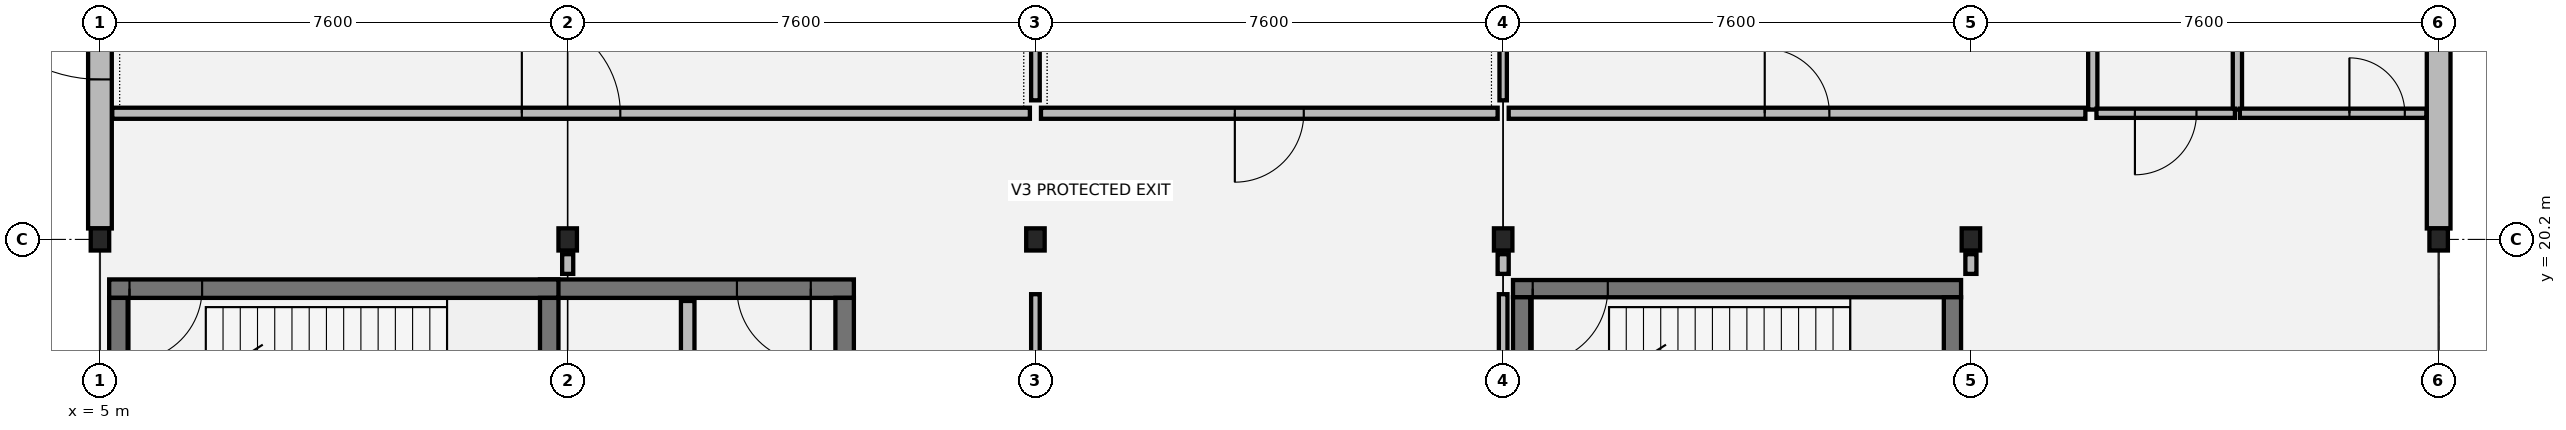
"""IFC4 building model, lengths in metres.
Left out: names, types, materials, properties, quantities, classifications, styles, units other than length and angle.
Written with IfcOpenShell. Run it as: python <this file> out.ifc"""

import sys

from ifc_helpers import new_model, si_unit, direction, frame, frame_2d, origin, origin_2d, place, context, subcontext, project, spatial, rectangle, i_section, extrude, element, fill, save


model = new_model("IFC4")
c1 = context("Model", 3, precision=1e-05, world=origin(), true_north=direction((0.0, 1.0)))
c2 = subcontext(c1, "Body", "Model", "MODEL_VIEW")
j1 = project(units=[si_unit("LENGTHUNIT", "METRE"), si_unit("PLANEANGLEUNIT", "RADIAN")], contexts=[c1])
p1 = place(None, origin())
s1 = spatial("IfcSite", under=j1, at=p1, CompositionType="ELEMENT")
p2 = place(p1, origin())
s2 = spatial("IfcBuilding", under=s1, at=p2, CompositionType="ELEMENT")
p3 = place(p2, origin())
s3 = spatial("IfcBuildingStorey", under=s2, at=p3, CompositionType="ELEMENT", Elevation=0.0)
for number, where, z_axis, x_axis in (
    (1, (5.0, 20.2, 0.0), (0.0, 0.0, 1.0), (1.0, 0.0, 0.0)),
    (2, (12.6, 20.2, 0.0), (0.0, 0.0, 1.0), (1.0, 0.0, 0.0)),
    (3, (20.2, 20.2, 0.0), (0.0, 0.0, 1.0), (1.0, 0.0, 0.0)),
    (4, (27.8, 20.2, 0.0), (0.0, 0.0, 1.0), (1.0, 0.0, 0.0)),
    (5, (35.4, 20.2, 0.0), (0.0, 0.0, 1.0), (1.0, 0.0, 0.0)),
    (6, (43.0, 20.2, 0.0), (0.0, 0.0, 1.0), (1.0, 0.0, 0.0)),
):
    element("IfcColumn", number, at=place(p3, frame(where, z_axis=z_axis, x_axis=x_axis)), inside=s3, PredefinedType="COLUMN", context=c2, shape_type="SweptSolid", body=[
        extrude(i_section(OverallWidth=0.3, OverallDepth=0.36, WebThickness=0.012, FlangeThickness=0.022, at=origin_2d()), origin(), (0.0, 0.0, 1.0), 5.075),
    ])
p4 = place(p3, frame((43.0, 20.378, 0.0), z_axis=(0.0, 0.0, 1.0), x_axis=(0.0, 1.0, 0.0)))
e7 = element("IfcWall", 7, at=p4, inside=s3, PredefinedType="SOLIDWALL", context=c2, shape_type="SweptSolid", body=[
    extrude(rectangle(XDim=7.244, YDim=0.385, at=frame_2d((3.622, 0.0))), origin(), (0.0, 0.0, 1.0), 4.5),
])
p5 = place(p3, frame((5.0, 27.622, 0.0), z_axis=(0.0, 0.0, 1.0), x_axis=(0.0, -1.0, 0.0)))
e8 = element("IfcWall", 8, at=p5, inside=s3, PredefinedType="SOLIDWALL", context=c2, shape_type="SweptSolid", body=[
    extrude(rectangle(XDim=7.244, YDim=0.385, at=frame_2d((3.622, 0.0))), origin(), (0.0, 0.0, 1.0), 4.5),
])
p6 = place(p5, frame((2.422, 0.0, 0.0)))
e9 = element("IfcOpeningElement", 9, at=p6, cuts=e8, PredefinedType="OPENING", context=c2, shape_type="SweptSolid", body=[
    extrude(rectangle(XDim=2.4, YDim=2.6, at=frame_2d((1.2, 1.3))), frame((0.0, 0.202, 0.0), z_axis=(0.0, -1.0, 0.0), x_axis=(1.0, 0.0, 0.0)), (0.0, 0.0, 1.0), 0.405),
])
p7 = place(p3, frame((17.25, 19.4, 0.0), z_axis=(0.0, 0.0, 1.0), x_axis=(-1.0, 0.0, 0.0)))
e10 = element("IfcWall", 10, at=p7, inside=s3, PredefinedType="SHEAR", context=c2, shape_type="SweptSolid", body=[
    extrude(rectangle(XDim=5.1, YDim=0.3, at=frame_2d((2.55, 0.0))), origin(), (0.0, 0.0, 1.0), 4.922),
])
p8 = place(p7, frame((0.7, 0.0, 0.0)))
e11 = element("IfcOpeningElement", 11, at=p8, cuts=e10, PredefinedType="OPENING", context=c2, shape_type="SweptSolid", body=[
    extrude(rectangle(XDim=1.2, YDim=2.16, at=frame_2d((0.6, 1.08))), frame((0.0, 0.16, 0.0), z_axis=(0.0, -1.0, 0.0), x_axis=(1.0, 0.0, 0.0)), (0.0, 0.0, 1.0), 0.32),
])
p9 = place(p3, frame((17.1, 13.55, 0.0), z_axis=(0.0, 0.0, 1.0), x_axis=(0.0, 1.0, 0.0)))
e12 = element("IfcWall", 12, at=p9, inside=s3, PredefinedType="SHEAR", context=c2, shape_type="SweptSolid", body=[
    extrude(rectangle(XDim=5.7, YDim=0.3, at=frame_2d((2.85, 0.0))), origin(), (0.0, 0.0, 1.0), 4.922),
])
p10 = place(p3, frame((14.55, 13.6, 0.0), z_axis=(0.0, 0.0, 1.0), x_axis=(0.0, 1.0, 0.0)))
e13 = element("IfcWall", 13, at=p10, inside=s3, PredefinedType="SOLIDWALL", context=c2, shape_type="SweptSolid", body=[
    extrude(rectangle(XDim=5.6, YDim=0.22, at=frame_2d((2.8, 0.0))), origin(), (0.0, 0.0, 1.0), 4.922),
])
p11 = place(p10, frame((0.35, 0.0, 0.0)))
e14 = element("IfcOpeningElement", 14, at=p11, cuts=e13, PredefinedType="OPENING", context=c2, shape_type="SweptSolid", body=[
    extrude(rectangle(XDim=1.1, YDim=2.15, at=frame_2d((0.55, 1.075))), frame((0.0, 0.12, 0.0), z_axis=(0.0, -1.0, 0.0), x_axis=(1.0, 0.0, 0.0)), (0.0, 0.0, 1.0), 0.24),
])
p12 = place(p3, frame((5.15, 19.4, 0.0), z_axis=(0.0, 0.0, 1.0), x_axis=(1.0, 0.0, 0.0)))
e15 = element("IfcWall", 15, at=p12, inside=s3, PredefinedType="SHEAR", context=c2, shape_type="SweptSolid", body=[
    extrude(rectangle(XDim=7.3, YDim=0.3, at=frame_2d((3.65, 0.0))), origin(), (0.0, 0.0, 1.0), 4.922),
])
p13 = place(p12, frame((0.33, 0.0, 0.0)))
e16 = element("IfcOpeningElement", 16, at=p13, cuts=e15, PredefinedType="OPENING", context=c2, shape_type="SweptSolid", body=[
    extrude(rectangle(XDim=1.18, YDim=2.18, at=frame_2d((0.59, 1.09))), frame((0.0, 0.16, 0.0), z_axis=(0.0, -1.0, 0.0), x_axis=(1.0, 0.0, 0.0)), (0.0, 0.0, 1.0), 0.32),
])
for number, where, z_axis, x_axis in (
    (17, (5.3, 13.55, 0.0), (0.0, 0.0, 1.0), (0.0, 1.0, 0.0)),
    (18, (12.3, 13.55, 0.0), (0.0, 0.0, 1.0), (0.0, 1.0, 0.0)),
):
    element("IfcWall", number, at=place(p3, frame(where, z_axis=z_axis, x_axis=x_axis)), inside=s3, PredefinedType="SHEAR", context=c2, shape_type="SweptSolid", body=[
        extrude(rectangle(XDim=5.7, YDim=0.3, at=frame_2d((2.85, 0.0))), origin(), (0.0, 0.0, 1.0), 4.922),
    ])
p14 = place(p3, frame((27.96, 19.4, 0.0), z_axis=(0.0, 0.0, 1.0), x_axis=(1.0, 0.0, 0.0)))
e19 = element("IfcWall", 19, at=p14, inside=s3, PredefinedType="SHEAR", context=c2, shape_type="SweptSolid", body=[
    extrude(rectangle(XDim=7.28, YDim=0.28, at=frame_2d((3.64, 0.0))), origin(), (0.0, 0.0, 1.0), 4.922),
])
p15 = place(p14, frame((0.32, 0.0, 0.0)))
e20 = element("IfcOpeningElement", 20, at=p15, cuts=e19, PredefinedType="OPENING", context=c2, shape_type="SweptSolid", body=[
    extrude(rectangle(XDim=1.22, YDim=2.18, at=frame_2d((0.61, 1.09))), frame((0.0, 0.15, 0.0), z_axis=(0.0, -1.0, 0.0), x_axis=(1.0, 0.0, 0.0)), (0.0, 0.0, 1.0), 0.3),
])
for number, where, z_axis, x_axis in (
    (21, (28.1, 13.54, 0.0), (0.0, 0.0, 1.0), (0.0, 1.0, 0.0)),
    (22, (35.1, 13.54, 0.0), (0.0, 0.0, 1.0), (0.0, 1.0, 0.0)),
):
    element("IfcWall", number, at=place(p3, frame(where, z_axis=z_axis, x_axis=x_axis)), inside=s3, PredefinedType="SHEAR", context=c2, shape_type="SweptSolid", body=[
        extrude(rectangle(XDim=5.72, YDim=0.28, at=frame_2d((2.86, 0.0))), origin(), (0.0, 0.0, 1.0), 4.922),
    ])
for number, where, z_axis, x_axis in (
    (23, (37.38, 22.31, 0.0), (0.0, 0.0, 1.0), (0.0, 1.0, 0.0)),
    (24, (39.73, 22.31, 0.0), (0.0, 0.0, 1.0), (0.0, 1.0, 0.0)),
):
    element("IfcWall", number, at=place(p3, frame(where, z_axis=z_axis, x_axis=x_axis)), inside=s3, PredefinedType="PARTITIONING", context=c2, shape_type="SweptSolid", body=[
        extrude(rectangle(XDim=2.36, YDim=0.15, at=frame_2d((1.18, 0.0))), origin(), (0.0, 0.0, 1.0), 4.2),
    ])
p16 = place(p3, frame((37.44, 22.25, 0.0), z_axis=(0.0, 0.0, 1.0), x_axis=(1.0, 0.0, 0.0)))
e25 = element("IfcWall", 25, at=p16, inside=s3, PredefinedType="PARTITIONING", context=c2, shape_type="SweptSolid", body=[
    extrude(rectangle(XDim=2.25, YDim=0.15, at=frame_2d((1.125, 0.0))), origin(), (0.0, 0.0, 1.0), 4.2),
])
p17 = place(p16, frame((0.625, 0.0, 0.0)))
e26 = element("IfcOpeningElement", 26, at=p17, cuts=e25, PredefinedType="OPENING", context=c2, shape_type="SweptSolid", body=[
    extrude(rectangle(XDim=1.0, YDim=2.15, at=frame_2d((0.5, 1.075))), frame((0.0, 0.085, 0.0), z_axis=(0.0, -1.0, 0.0), x_axis=(1.0, 0.0, 0.0)), (0.0, 0.0, 1.0), 0.17),
])
p18 = place(p3, frame((39.77, 22.25, 0.0), z_axis=(0.0, 0.0, 1.0), x_axis=(1.0, 0.0, 0.0)))
e27 = element("IfcWall", 27, at=p18, inside=s3, PredefinedType="PARTITIONING", context=c2, shape_type="SweptSolid", body=[
    extrude(rectangle(XDim=3.03, YDim=0.15, at=frame_2d((1.515, 0.0))), origin(), (0.0, 0.0, 1.0), 4.2),
])
p19 = place(p18, frame((1.78, 0.0, 0.0)))
e28 = element("IfcOpeningElement", 28, at=p19, cuts=e27, PredefinedType="OPENING", context=c2, shape_type="SweptSolid", body=[
    extrude(rectangle(XDim=0.9, YDim=2.15, at=frame_2d((0.45, 1.075))), frame((0.0, 0.085, 0.0), z_axis=(0.0, -1.0, 0.0), x_axis=(1.0, 0.0, 0.0)), (0.0, 0.0, 1.0), 0.17),
])
p20 = place(p3, frame((5.2, 22.25, 0.0), z_axis=(0.0, 0.0, 1.0), x_axis=(1.0, 0.0, 0.0)))
e29 = element("IfcWall", 29, at=p20, inside=s3, PredefinedType="PARTITIONING", context=c2, shape_type="SweptSolid", body=[
    extrude(rectangle(XDim=14.91, YDim=0.18, at=frame_2d((7.455, 0.0))), origin(), (0.0, 0.0, 1.0), 4.2),
])
p21 = place(p20, frame((6.655, 0.0, 0.0)))
e30 = element("IfcOpeningElement", 30, at=p21, cuts=e29, PredefinedType="OPENING", context=c2, shape_type="SweptSolid", body=[
    extrude(rectangle(XDim=1.6, YDim=2.25, at=frame_2d((0.8, 1.125))), frame((0.0, 0.1, 0.0), z_axis=(0.0, -1.0, 0.0), x_axis=(1.0, 0.0, 0.0)), (0.0, 0.0, 1.0), 0.2),
])
p22 = place(p3, frame((20.29, 22.25, 0.0), z_axis=(0.0, 0.0, 1.0), x_axis=(1.0, 0.0, 0.0)))
e31 = element("IfcWall", 31, at=p22, inside=s3, PredefinedType="PARTITIONING", context=c2, shape_type="SweptSolid", body=[
    extrude(rectangle(XDim=7.42, YDim=0.18, at=frame_2d((3.71, 0.0))), origin(), (0.0, 0.0, 1.0), 4.2),
])
p23 = place(p22, frame((3.15, 0.0, 0.0)))
e32 = element("IfcOpeningElement", 32, at=p23, cuts=e31, PredefinedType="OPENING", context=c2, shape_type="SweptSolid", body=[
    extrude(rectangle(XDim=1.12, YDim=2.15, at=frame_2d((0.56, 1.075))), frame((0.0, 0.1, 0.0), z_axis=(0.0, -1.0, 0.0), x_axis=(1.0, 0.0, 0.0)), (0.0, 0.0, 1.0), 0.2),
])
p24 = place(p3, frame((27.89, 22.25, 0.0), z_axis=(0.0, 0.0, 1.0), x_axis=(1.0, 0.0, 0.0)))
e33 = element("IfcWall", 33, at=p24, inside=s3, PredefinedType="PARTITIONING", context=c2, shape_type="SweptSolid", body=[
    extrude(rectangle(XDim=9.37, YDim=0.18, at=frame_2d((4.685, 0.0))), origin(), (0.0, 0.0, 1.0), 4.2),
])
p25 = place(p24, frame((4.16, 0.0, 0.0)))
e34 = element("IfcOpeningElement", 34, at=p25, cuts=e33, PredefinedType="OPENING", context=c2, shape_type="SweptSolid", body=[
    extrude(rectangle(XDim=1.05, YDim=2.15, at=frame_2d((0.525, 1.075))), frame((0.0, 0.1, 0.0), z_axis=(0.0, -1.0, 0.0), x_axis=(1.0, 0.0, 0.0)), (0.0, 0.0, 1.0), 0.2),
])
for number, where, z_axis, x_axis in (
    (35, (12.6, 19.64, 0.0), (0.0, 0.0, 1.0), (0.0, 1.0, 0.0)),
    (36, (27.8, 19.64, 0.0), (0.0, 0.0, 1.0), (0.0, 1.0, 0.0)),
    (37, (35.4, 19.64, 0.0), (0.0, 0.0, 1.0), (0.0, 1.0, 0.0)),
):
    element("IfcWall", number, at=place(p3, frame(where, z_axis=z_axis, x_axis=x_axis)), inside=s3, PredefinedType="PARTITIONING", context=c2, shape_type="SweptSolid", body=[
        extrude(rectangle(XDim=0.32, YDim=0.18, at=frame_2d((0.16, 0.0))), origin(), (0.0, 0.0, 1.0), 4.2),
    ])
p26 = place(p3, frame((20.2, 22.46, 0.0), z_axis=(0.0, 0.0, 1.0), x_axis=(0.0, 1.0, 0.0)))
e38 = element("IfcWall", 38, at=p26, inside=s3, PredefinedType="PARTITIONING", context=c2, shape_type="SweptSolid", body=[
    extrude(rectangle(XDim=12.62, YDim=0.14, at=frame_2d((6.31, 0.0))), origin(), (0.0, 0.0, 1.0), 4.2),
])
p27 = place(p3, frame((20.2, 5.32, 0.0), z_axis=(0.0, 0.0, 1.0), x_axis=(0.0, 1.0, 0.0)))
e39 = element("IfcWall", 39, at=p27, inside=s3, PredefinedType="PARTITIONING", context=c2, shape_type="SweptSolid", body=[
    extrude(rectangle(XDim=13.99, YDim=0.14, at=frame_2d((6.995, 0.0))), origin(), (0.0, 0.0, 1.0), 4.2),
])
p28 = place(p27, frame((4.945, 0.0, 0.0)))
e40 = element("IfcOpeningElement", 40, at=p28, cuts=e39, PredefinedType="OPENING", context=c2, shape_type="SweptSolid", body=[
    extrude(rectangle(XDim=1.4, YDim=2.22, at=frame_2d((0.7, 1.11))), frame((0.0, 0.08, 0.0), z_axis=(0.0, -1.0, 0.0), x_axis=(1.0, 0.0, 0.0)), (0.0, 0.0, 1.0), 0.16),
])
p29 = place(p3, frame((27.8, 22.46, 0.0), z_axis=(0.0, 0.0, 1.0), x_axis=(0.0, 1.0, 0.0)))
e41 = element("IfcWall", 41, at=p29, inside=s3, PredefinedType="PARTITIONING", context=c2, shape_type="SweptSolid", body=[
    extrude(rectangle(XDim=12.62, YDim=0.12, at=frame_2d((6.31, 0.0))), origin(), (0.0, 0.0, 1.0), 4.2),
])
p30 = place(p3, frame((27.8, 5.32, 0.0), z_axis=(0.0, 0.0, 1.0), x_axis=(0.0, 1.0, 0.0)))
e42 = element("IfcWall", 42, at=p30, inside=s3, PredefinedType="PARTITIONING", context=c2, shape_type="SweptSolid", body=[
    extrude(rectangle(XDim=13.99, YDim=0.14, at=frame_2d((6.995, 0.0))), origin(), (0.0, 0.0, 1.0), 2.445),
])
p31 = place(p30, frame((5.015, 0.0, 0.0)))
e43 = element("IfcOpeningElement", 43, at=p31, cuts=e42, PredefinedType="OPENING", context=c2, shape_type="SweptSolid", body=[
    extrude(rectangle(XDim=1.26, YDim=2.2, at=frame_2d((0.63, 1.1))), frame((0.0, 0.08, 0.0), z_axis=(0.0, -1.0, 0.0), x_axis=(1.0, 0.0, 0.0)), (0.0, 0.0, 1.0), 0.16),
])
p32 = place(p6, origin())
e44 = element("IfcDoor", 44, at=p32, inside=s3, OperationType="SINGLE_SWING_RIGHT", PredefinedType="DOOR", context=c2, shape_type="SweptSolid", body=[
    extrude(rectangle(XDim=2.4, YDim=2.6, at=frame_2d((1.2, 1.3))), frame((0.0, 0.025, 0.0), z_axis=(0.0, -1.0, 0.0), x_axis=(1.0, 0.0, 0.0)), (0.0, 0.0, 1.0), 0.05),
])
fill(e9, e44)
p33 = place(p8, origin())
e45 = element("IfcDoor", 45, at=p33, inside=s3, OperationType="SINGLE_SWING_LEFT", PredefinedType="DOOR", context=c2, shape_type="SweptSolid", body=[
    extrude(rectangle(XDim=1.2, YDim=2.16, at=frame_2d((0.6, 1.08))), frame((0.0, 0.025, 0.0), z_axis=(0.0, -1.0, 0.0), x_axis=(1.0, 0.0, 0.0)), (0.0, 0.0, 1.0), 0.05),
])
fill(e11, e45)
p34 = place(p13, origin())
e46 = element("IfcDoor", 46, at=p34, inside=s3, OperationType="SINGLE_SWING_RIGHT", PredefinedType="DOOR", context=c2, shape_type="SweptSolid", body=[
    extrude(rectangle(XDim=1.18, YDim=2.18, at=frame_2d((0.59, 1.09))), frame((0.0, 0.025, 0.0), z_axis=(0.0, -1.0, 0.0), x_axis=(1.0, 0.0, 0.0)), (0.0, 0.0, 1.0), 0.05),
])
fill(e16, e46)
p35 = place(p15, origin())
e47 = element("IfcDoor", 47, at=p35, inside=s3, OperationType="SINGLE_SWING_RIGHT", PredefinedType="DOOR", context=c2, shape_type="SweptSolid", body=[
    extrude(rectangle(XDim=1.22, YDim=2.18, at=frame_2d((0.61, 1.09))), frame((0.0, 0.025, 0.0), z_axis=(0.0, -1.0, 0.0), x_axis=(1.0, 0.0, 0.0)), (0.0, 0.0, 1.0), 0.05),
])
fill(e20, e47)
p36 = place(p17, origin())
e48 = element("IfcDoor", 48, at=p36, inside=s3, OperationType="SINGLE_SWING_RIGHT", PredefinedType="DOOR", context=c2, shape_type="SweptSolid", body=[
    extrude(rectangle(XDim=1.0, YDim=2.15, at=frame_2d((0.5, 1.075))), frame((0.0, 0.025, 0.0), z_axis=(0.0, -1.0, 0.0), x_axis=(1.0, 0.0, 0.0)), (0.0, 0.0, 1.0), 0.05),
])
fill(e26, e48)
p37 = place(p19, origin())
e49 = element("IfcDoor", 49, at=p37, inside=s3, OperationType="SINGLE_SWING_LEFT", PredefinedType="DOOR", context=c2, shape_type="SweptSolid", body=[
    extrude(rectangle(XDim=0.9, YDim=2.15, at=frame_2d((0.45, 1.075))), frame((0.0, 0.025, 0.0), z_axis=(0.0, -1.0, 0.0), x_axis=(1.0, 0.0, 0.0)), (0.0, 0.0, 1.0), 0.05),
])
fill(e28, e49)
p38 = place(p21, origin())
e50 = element("IfcDoor", 50, at=p38, inside=s3, OperationType="DOUBLE_DOOR_SINGLE_SWING", PredefinedType="DOOR", context=c2, shape_type="SweptSolid", body=[
    extrude(rectangle(XDim=1.6, YDim=2.25, at=frame_2d((0.8, 1.125))), frame((0.0, 0.025, 0.0), z_axis=(0.0, -1.0, 0.0), x_axis=(1.0, 0.0, 0.0)), (0.0, 0.0, 1.0), 0.05),
])
fill(e30, e50)
p39 = place(p23, origin())
e51 = element("IfcDoor", 51, at=p39, inside=s3, OperationType="SINGLE_SWING_RIGHT", PredefinedType="DOOR", context=c2, shape_type="SweptSolid", body=[
    extrude(rectangle(XDim=1.12, YDim=2.15, at=frame_2d((0.56, 1.075))), frame((0.0, 0.025, 0.0), z_axis=(0.0, -1.0, 0.0), x_axis=(1.0, 0.0, 0.0)), (0.0, 0.0, 1.0), 0.05),
])
fill(e32, e51)
p40 = place(p25, origin())
e52 = element("IfcDoor", 52, at=p40, inside=s3, OperationType="SINGLE_SWING_LEFT", PredefinedType="DOOR", context=c2, shape_type="SweptSolid", body=[
    extrude(rectangle(XDim=1.05, YDim=2.15, at=frame_2d((0.525, 1.075))), frame((0.0, 0.025, 0.0), z_axis=(0.0, -1.0, 0.0), x_axis=(1.0, 0.0, 0.0)), (0.0, 0.0, 1.0), 0.05),
])
fill(e34, e52)
save(model, sys.argv[1])
